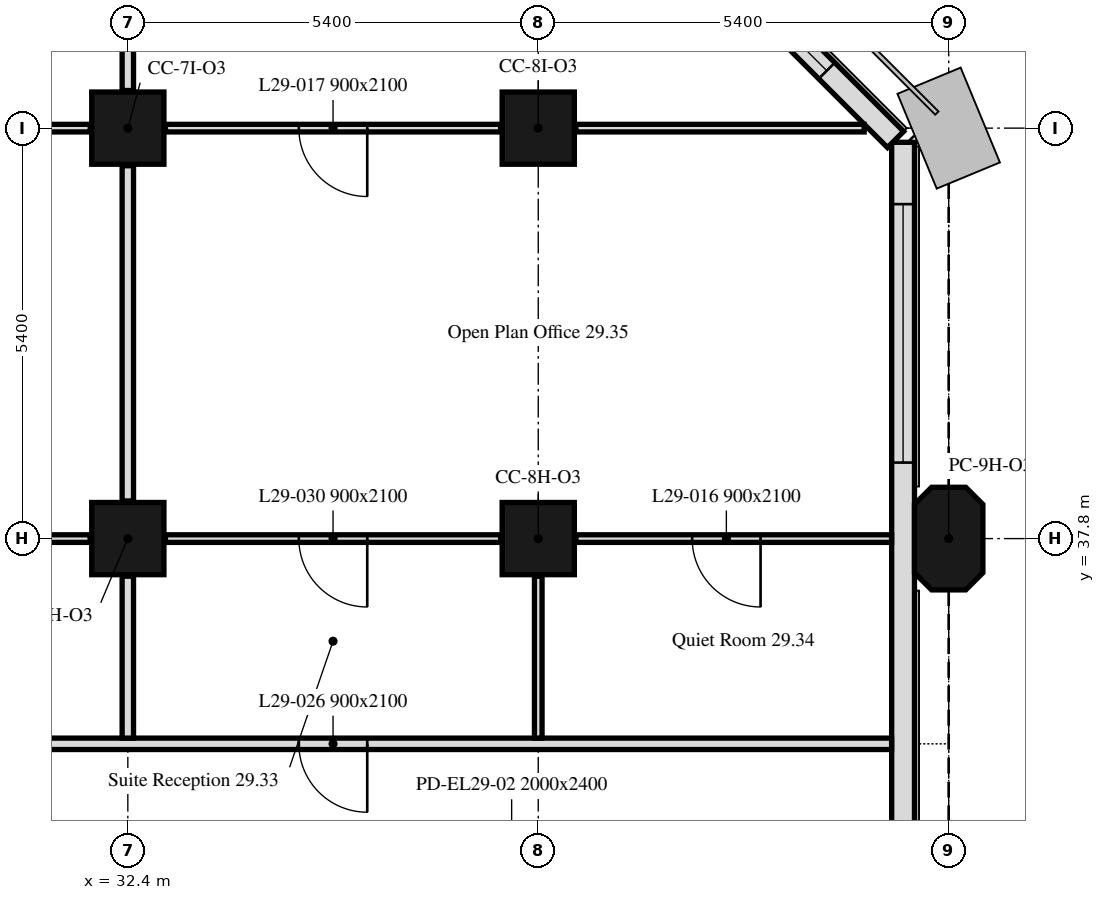
"""IFC4 building model, lengths in metres.
Left out: names, types, materials, properties, quantities, classifications, styles, units other than length and angle.
Written with IfcOpenShell. Run it as: python <this file> out.ifc"""

import sys

from ifc_helpers import new_model, si_unit, direction, frame, frame_2d, origin, origin_2d, place, context, subcontext, project, spatial, polyline, rectangle, outline, extrude, element, fill, save


model = new_model("IFC4")
c1 = context("Model", 3, precision=1e-05, world=origin(), true_north=direction((0.0, 1.0)))
c2 = subcontext(c1, "Body", "Model", "MODEL_VIEW")
j1 = project(units=[si_unit("LENGTHUNIT", "METRE"), si_unit("PLANEANGLEUNIT", "RADIAN")], contexts=[c1])
p1 = place(None, origin())
s1 = spatial("IfcSite", under=j1, at=p1, CompositionType="ELEMENT")
p2 = place(p1, origin())
s2 = spatial("IfcBuilding", under=s1, at=p2, CompositionType="ELEMENT")
p3 = place(p2, frame((0.0, 0.0, 122.0)))
s3 = spatial("IfcBuildingStorey", under=s2, at=p3, CompositionType="ELEMENT", Elevation=122.0)
for number, where, z_axis, x_axis in (
    (1, (32.4, 37.8, 0.0), (0.0, 0.0, 1.0), (1.0, 0.0, 0.0)),
    (2, (37.8, 37.8, 0.0), (0.0, 0.0, 1.0), (1.0, 0.0, 0.0)),
):
    element("IfcColumn", number, at=place(p3, frame(where, z_axis=z_axis, x_axis=x_axis)), inside=s3, PredefinedType="COLUMN", context=c2, shape_type="SweptSolid", body=[
        extrude(rectangle(XDim=0.95, YDim=0.95, at=origin_2d()), origin(), (0.0, 0.0, 1.0), 3.3),
    ])
p4 = place(p3, frame((43.2, 37.8, 0.0), z_axis=(0.0, 0.0, 1.0), x_axis=(0.0, 1.0, 0.0)))
e3 = element("IfcColumn", 3, at=p4, inside=s3, PredefinedType="COLUMN", context=c2, shape_type="SweptSolid", body=[
    extrude(outline(polyline([(-0.45, -0.45), (0.45, -0.45), (0.675, -0.225), (0.675, 0.225), (0.45, 0.45), (-0.45, 0.45), (-0.675, 0.225), (-0.675, -0.225), (-0.45, -0.45)])), origin(), (0.0, 0.0, 1.0), 3.3),
])
for number, where, z_axis, x_axis in (
    (4, (32.4, 43.2, 0.0), (0.0, 0.0, 1.0), (1.0, 0.0, 0.0)),
    (5, (37.8, 43.2, 0.0), (0.0, 0.0, 1.0), (1.0, 0.0, 0.0)),
):
    element("IfcColumn", number, at=place(p3, frame(where, z_axis=z_axis, x_axis=x_axis)), inside=s3, PredefinedType="COLUMN", context=c2, shape_type="SweptSolid", body=[
        extrude(rectangle(XDim=0.95, YDim=0.95, at=origin_2d()), origin(), (0.0, 0.0, 1.0), 3.3),
    ])
p5 = place(p3, frame((42.6, 32.4, 0.0), z_axis=(0.0, 0.0, 1.0), x_axis=(0.0, 1.0, 0.0)))
e6 = element("IfcWall", 6, at=p5, inside=s3, PredefinedType="SOLIDWALL", context=c2, shape_type="SweptSolid", body=[
    extrude(rectangle(XDim=10.614, YDim=0.3, at=frame_2d((5.307, 0.0))), origin(), (0.0, 0.0, 1.0), 3.3),
])
p6 = place(p5, frame((6.4, 0.0, 0.9)))
e7 = element("IfcOpeningElement", 7, at=p6, cuts=e6, PredefinedType="OPENING", context=c2, shape_type="SweptSolid", body=[
    extrude(rectangle(XDim=3.4, YDim=1.7, at=frame_2d((1.7, 0.85))), frame((0.0, 0.16, 0.0), z_axis=(0.0, -1.0, 0.0), x_axis=(1.0, 0.0, 0.0)), (0.0, 0.0, 1.0), 0.32),
])
p7 = place(p3, frame((42.501, 43.051, 0.0), z_axis=(0.0, 0.0, 1.0), x_axis=(-0.707106781187, 0.707106781187, 0.0)))
e8 = element("IfcWall", 8, at=p7, inside=s3, PredefinedType="SOLIDWALL", context=c2, shape_type="SweptSolid", body=[
    extrude(rectangle(XDim=6.86, YDim=0.3, at=frame_2d((3.43, 0.0))), origin(), (0.0, 0.0, 1.0), 3.3),
])
p8 = place(p7, frame((1.28, 0.0, 0.9)))
e9 = element("IfcOpeningElement", 9, at=p8, cuts=e8, PredefinedType="OPENING", context=c2, shape_type="SweptSolid", body=[
    extrude(rectangle(XDim=1.1, YDim=1.7, at=frame_2d((0.55, 0.85))), frame((0.0, 0.16, 0.0), z_axis=(0.0, -1.0, 0.0), x_axis=(1.0, 0.0, 0.0)), (0.0, 0.0, 1.0), 0.32),
])
p9 = place(p7, frame((4.48, 0.0, 0.9)))
e10 = element("IfcOpeningElement", 10, at=p9, cuts=e8, PredefinedType="OPENING", context=c2, shape_type="SweptSolid", body=[
    extrude(rectangle(XDim=1.1, YDim=1.7, at=frame_2d((0.55, 0.85))), frame((0.0, 0.16, 0.0), z_axis=(0.0, -1.0, 0.0), x_axis=(1.0, 0.0, 0.0)), (0.0, 0.0, 1.0), 0.32),
])
p10 = place(p3, frame((42.449, 35.1, 0.0), z_axis=(0.0, 0.0, 1.0), x_axis=(-1.0, 0.0, 0.0)))
e11 = element("IfcWall", 11, at=p10, inside=s3, PredefinedType="PARTITIONING", context=c2, shape_type="SweptSolid", body=[
    extrude(rectangle(XDim=41.698, YDim=0.15, at=frame_2d((20.849, 0.0))), origin(), (0.0, 0.0, 1.0), 2.55),
])
p11 = place(p10, frame((29.119, 0.0, 0.0)))
e12 = element("IfcOpeningElement", 12, at=p11, cuts=e11, PredefinedType="OPENING", context=c2, shape_type="SweptSolid", body=[
    extrude(rectangle(XDim=0.9, YDim=2.1, at=frame_2d((0.45, 1.05))), frame((0.0, 0.075, 0.0), z_axis=(0.0, -1.0, 0.0), x_axis=(1.0, 0.0, 0.0)), (0.0, 0.0, 1.0), 0.15),
])
p12 = place(p10, frame((27.879, 0.0, 0.0)))
e13 = element("IfcOpeningElement", 13, at=p12, cuts=e11, PredefinedType="OPENING", context=c2, shape_type="SweptSolid", body=[
    extrude(rectangle(XDim=0.9, YDim=2.1, at=frame_2d((0.45, 1.05))), frame((0.0, 0.075, 0.0), z_axis=(0.0, -1.0, 0.0), x_axis=(1.0, 0.0, 0.0)), (0.0, 0.0, 1.0), 0.15),
])
p13 = place(p10, frame((18.319, 0.0, 0.0)))
e14 = element("IfcOpeningElement", 14, at=p13, cuts=e11, PredefinedType="OPENING", context=c2, shape_type="SweptSolid", body=[
    extrude(rectangle(XDim=0.9, YDim=2.1, at=frame_2d((0.45, 1.05))), frame((0.0, 0.075, 0.0), z_axis=(0.0, -1.0, 0.0), x_axis=(1.0, 0.0, 0.0)), (0.0, 0.0, 1.0), 0.15),
])
p14 = place(p10, frame((38.624, 0.0, 0.0)))
e15 = element("IfcOpeningElement", 15, at=p14, cuts=e11, PredefinedType="OPENING", context=c2, shape_type="SweptSolid", body=[
    extrude(rectangle(XDim=0.9, YDim=2.1, at=frame_2d((0.45, 1.05))), frame((0.0, 0.075, 0.0), z_axis=(0.0, -1.0, 0.0), x_axis=(1.0, 0.0, 0.0)), (0.0, 0.0, 1.0), 0.15),
])
p15 = place(p10, frame((23.099, 0.0, 0.0)))
e16 = element("IfcOpeningElement", 16, at=p15, cuts=e11, PredefinedType="OPENING", context=c2, shape_type="SweptSolid", body=[
    extrude(rectangle(XDim=0.9, YDim=2.1, at=frame_2d((0.45, 1.05))), frame((0.0, 0.075, 0.0), z_axis=(0.0, -1.0, 0.0), x_axis=(1.0, 0.0, 0.0)), (0.0, 0.0, 1.0), 0.15),
])
p16 = place(p10, frame((6.899, 0.0, 0.0)))
e17 = element("IfcOpeningElement", 17, at=p16, cuts=e11, PredefinedType="OPENING", context=c2, shape_type="SweptSolid", body=[
    extrude(rectangle(XDim=0.9, YDim=2.1, at=frame_2d((0.45, 1.05))), frame((0.0, 0.075, 0.0), z_axis=(0.0, -1.0, 0.0), x_axis=(1.0, 0.0, 0.0)), (0.0, 0.0, 1.0), 0.15),
])
p17 = place(p3, frame((32.4, 35.175, 0.0), z_axis=(0.0, 0.0, 1.0), x_axis=(0.0, 1.0, 0.0)))
e18 = element("IfcWall", 18, at=p17, inside=s3, PredefinedType="PARTITIONING", context=c2, shape_type="SweptSolid", body=[
    extrude(rectangle(XDim=2.13, YDim=0.15, at=frame_2d((1.065, 0.0))), origin(), (0.0, 0.0, 1.0), 2.55),
])
p18 = place(p3, frame((31.905, 37.8, 0.0), z_axis=(0.0, 0.0, 1.0), x_axis=(-1.0, 0.0, 0.0)))
e19 = element("IfcWall", 19, at=p18, inside=s3, PredefinedType="PARTITIONING", context=c2, shape_type="SweptSolid", body=[
    extrude(rectangle(XDim=4.41, YDim=0.1, at=frame_2d((2.205, 0.0))), origin(), (0.0, 0.0, 1.0), 3.3),
])
p19 = place(p18, frame((1.755, 0.0, 0.0)))
e20 = element("IfcOpeningElement", 20, at=p19, cuts=e19, PredefinedType="OPENING", context=c2, shape_type="SweptSolid", body=[
    extrude(rectangle(XDim=0.9, YDim=2.1, at=frame_2d((0.45, 1.05))), frame((0.0, 0.05, 0.0), z_axis=(0.0, -1.0, 0.0), x_axis=(1.0, 0.0, 0.0)), (0.0, 0.0, 1.0), 0.1),
])
p20 = place(p3, frame((32.4, 38.295, 0.0), z_axis=(0.0, 0.0, 1.0), x_axis=(0.0, 1.0, 0.0)))
e21 = element("IfcWall", 21, at=p20, inside=s3, PredefinedType="PARTITIONING", context=c2, shape_type="SweptSolid", body=[
    extrude(rectangle(XDim=4.41, YDim=0.15, at=frame_2d((2.205, 0.0))), origin(), (0.0, 0.0, 1.0), 2.55),
])
p21 = place(p3, frame((31.905, 43.2, 0.0), z_axis=(0.0, 0.0, 1.0), x_axis=(-1.0, 0.0, 0.0)))
e22 = element("IfcWall", 22, at=p21, inside=s3, PredefinedType="PARTITIONING", context=c2, shape_type="SweptSolid", body=[
    extrude(rectangle(XDim=4.41, YDim=0.1, at=frame_2d((2.205, 0.0))), origin(), (0.0, 0.0, 1.0), 3.3),
])
p22 = place(p21, frame((1.755, 0.0, 0.0)))
e23 = element("IfcOpeningElement", 23, at=p22, cuts=e22, PredefinedType="OPENING", context=c2, shape_type="SweptSolid", body=[
    extrude(rectangle(XDim=0.9, YDim=2.1, at=frame_2d((0.45, 1.05))), frame((0.0, 0.05, 0.0), z_axis=(0.0, -1.0, 0.0), x_axis=(1.0, 0.0, 0.0)), (0.0, 0.0, 1.0), 0.1),
])
p23 = place(p3, frame((32.4, 43.695, 0.0), z_axis=(0.0, 0.0, 1.0), x_axis=(0.0, 1.0, 0.0)))
e24 = element("IfcWall", 24, at=p23, inside=s3, PredefinedType="PARTITIONING", context=c2, shape_type="SweptSolid", body=[
    extrude(rectangle(XDim=4.154, YDim=0.15, at=frame_2d((2.077, 0.0))), origin(), (0.0, 0.0, 1.0), 2.55),
])
p24 = place(p3, frame((37.8, 35.175, 0.0), z_axis=(0.0, 0.0, 1.0), x_axis=(0.0, 1.0, 0.0)))
e25 = element("IfcWall", 25, at=p24, inside=s3, PredefinedType="PARTITIONING", context=c2, shape_type="SweptSolid", body=[
    extrude(rectangle(XDim=2.13, YDim=0.1, at=frame_2d((1.065, 0.0))), origin(), (0.0, 0.0, 1.0), 3.3),
])
p25 = place(p3, frame((37.305, 37.8, 0.0), z_axis=(0.0, 0.0, 1.0), x_axis=(-1.0, 0.0, 0.0)))
e26 = element("IfcWall", 26, at=p25, inside=s3, PredefinedType="PARTITIONING", context=c2, shape_type="SweptSolid", body=[
    extrude(rectangle(XDim=4.41, YDim=0.1, at=frame_2d((2.205, 0.0))), origin(), (0.0, 0.0, 1.0), 3.3),
])
p26 = place(p25, frame((1.755, 0.0, 0.0)))
e27 = element("IfcOpeningElement", 27, at=p26, cuts=e26, PredefinedType="OPENING", context=c2, shape_type="SweptSolid", body=[
    extrude(rectangle(XDim=0.9, YDim=2.1, at=frame_2d((0.45, 1.05))), frame((0.0, 0.05, 0.0), z_axis=(0.0, -1.0, 0.0), x_axis=(1.0, 0.0, 0.0)), (0.0, 0.0, 1.0), 0.1),
])
p27 = place(p3, frame((42.449, 37.8, 0.0), z_axis=(0.0, 0.0, 1.0), x_axis=(-1.0, 0.0, 0.0)))
e28 = element("IfcWall", 28, at=p27, inside=s3, PredefinedType="PARTITIONING", context=c2, shape_type="SweptSolid", body=[
    extrude(rectangle(XDim=4.154, YDim=0.1, at=frame_2d((2.077, 0.0))), origin(), (0.0, 0.0, 1.0), 3.3),
])
p28 = place(p27, frame((1.724, 0.0, 0.0)))
e29 = element("IfcOpeningElement", 29, at=p28, cuts=e28, PredefinedType="OPENING", context=c2, shape_type="SweptSolid", body=[
    extrude(rectangle(XDim=0.9, YDim=2.1, at=frame_2d((0.45, 1.05))), frame((0.0, 0.05, 0.0), z_axis=(0.0, -1.0, 0.0), x_axis=(1.0, 0.0, 0.0)), (0.0, 0.0, 1.0), 0.1),
])
p29 = place(p3, frame((42.088, 43.2, 0.0), z_axis=(0.0, 0.0, 1.0), x_axis=(-1.0, 0.0, 0.0)))
e30 = element("IfcWall", 30, at=p29, inside=s3, PredefinedType="PARTITIONING", context=c2, shape_type="SweptSolid", body=[
    extrude(rectangle(XDim=3.793, YDim=0.1, at=frame_2d((1.896, 0.0))), origin(), (0.0, 0.0, 1.0), 3.3),
])
p30 = place(p3, frame((37.305, 43.2, 0.0), z_axis=(0.0, 0.0, 1.0), x_axis=(-1.0, 0.0, 0.0)))
e31 = element("IfcWall", 31, at=p30, inside=s3, PredefinedType="PARTITIONING", context=c2, shape_type="SweptSolid", body=[
    extrude(rectangle(XDim=4.41, YDim=0.1, at=frame_2d((2.205, 0.0))), origin(), (0.0, 0.0, 1.0), 3.3),
])
p31 = place(p30, frame((1.755, 0.0, 0.0)))
e32 = element("IfcOpeningElement", 32, at=p31, cuts=e31, PredefinedType="OPENING", context=c2, shape_type="SweptSolid", body=[
    extrude(rectangle(XDim=0.9, YDim=2.1, at=frame_2d((0.45, 1.05))), frame((0.0, 0.05, 0.0), z_axis=(0.0, -1.0, 0.0), x_axis=(1.0, 0.0, 0.0)), (0.0, 0.0, 1.0), 0.1),
])
p32 = place(p6, origin())
e33 = element("IfcWindow", 33, at=p32, inside=s3, PartitioningType="SINGLE_PANEL", PredefinedType="WINDOW", context=c2, shape_type="SweptSolid", body=[
    extrude(rectangle(XDim=3.4, YDim=1.7, at=frame_2d((1.7, 0.85))), frame((0.0, 0.03, 0.0), z_axis=(0.0, -1.0, 0.0), x_axis=(1.0, 0.0, 0.0)), (0.0, 0.0, 1.0), 0.06),
])
fill(e7, e33)
p33 = place(p8, origin())
e34 = element("IfcWindow", 34, at=p33, inside=s3, PartitioningType="SINGLE_PANEL", PredefinedType="WINDOW", context=c2, shape_type="SweptSolid", body=[
    extrude(rectangle(XDim=1.1, YDim=1.7, at=frame_2d((0.55, 0.85))), frame((0.0, 0.03, 0.0), z_axis=(0.0, -1.0, 0.0), x_axis=(1.0, 0.0, 0.0)), (0.0, 0.0, 1.0), 0.06),
])
fill(e9, e34)
p34 = place(p28, origin())
e35 = element("IfcDoor", 35, at=p34, inside=s3, OperationType="SINGLE_SWING_RIGHT", PredefinedType="DOOR", context=c2, shape_type="SweptSolid", body=[
    extrude(rectangle(XDim=0.9, YDim=2.1, at=frame_2d((0.45, 1.05))), frame((0.0, 0.025, 0.0), z_axis=(0.0, -1.0, 0.0), x_axis=(1.0, 0.0, 0.0)), (0.0, 0.0, 1.0), 0.05),
])
fill(e29, e35)
p35 = place(p31, origin())
e36 = element("IfcDoor", 36, at=p35, inside=s3, OperationType="SINGLE_SWING_RIGHT", PredefinedType="DOOR", context=c2, shape_type="SweptSolid", body=[
    extrude(rectangle(XDim=0.9, YDim=2.1, at=frame_2d((0.45, 1.05))), frame((0.0, 0.025, 0.0), z_axis=(0.0, -1.0, 0.0), x_axis=(1.0, 0.0, 0.0)), (0.0, 0.0, 1.0), 0.05),
])
fill(e32, e36)
p36 = place(p16, origin())
e37 = element("IfcDoor", 37, at=p36, inside=s3, OperationType="SINGLE_SWING_LEFT", PredefinedType="DOOR", context=c2, shape_type="SweptSolid", body=[
    extrude(rectangle(XDim=0.9, YDim=2.1, at=frame_2d((0.45, 1.05))), frame((0.0, 0.025, 0.0), z_axis=(0.0, -1.0, 0.0), x_axis=(1.0, 0.0, 0.0)), (0.0, 0.0, 1.0), 0.05),
])
fill(e17, e37)
p37 = place(p26, origin())
e38 = element("IfcDoor", 38, at=p37, inside=s3, OperationType="SINGLE_SWING_LEFT", PredefinedType="DOOR", context=c2, shape_type="SweptSolid", body=[
    extrude(rectangle(XDim=0.9, YDim=2.1, at=frame_2d((0.45, 1.05))), frame((0.0, 0.025, 0.0), z_axis=(0.0, -1.0, 0.0), x_axis=(1.0, 0.0, 0.0)), (0.0, 0.0, 1.0), 0.05),
])
fill(e27, e38)
save(model, sys.argv[1])
